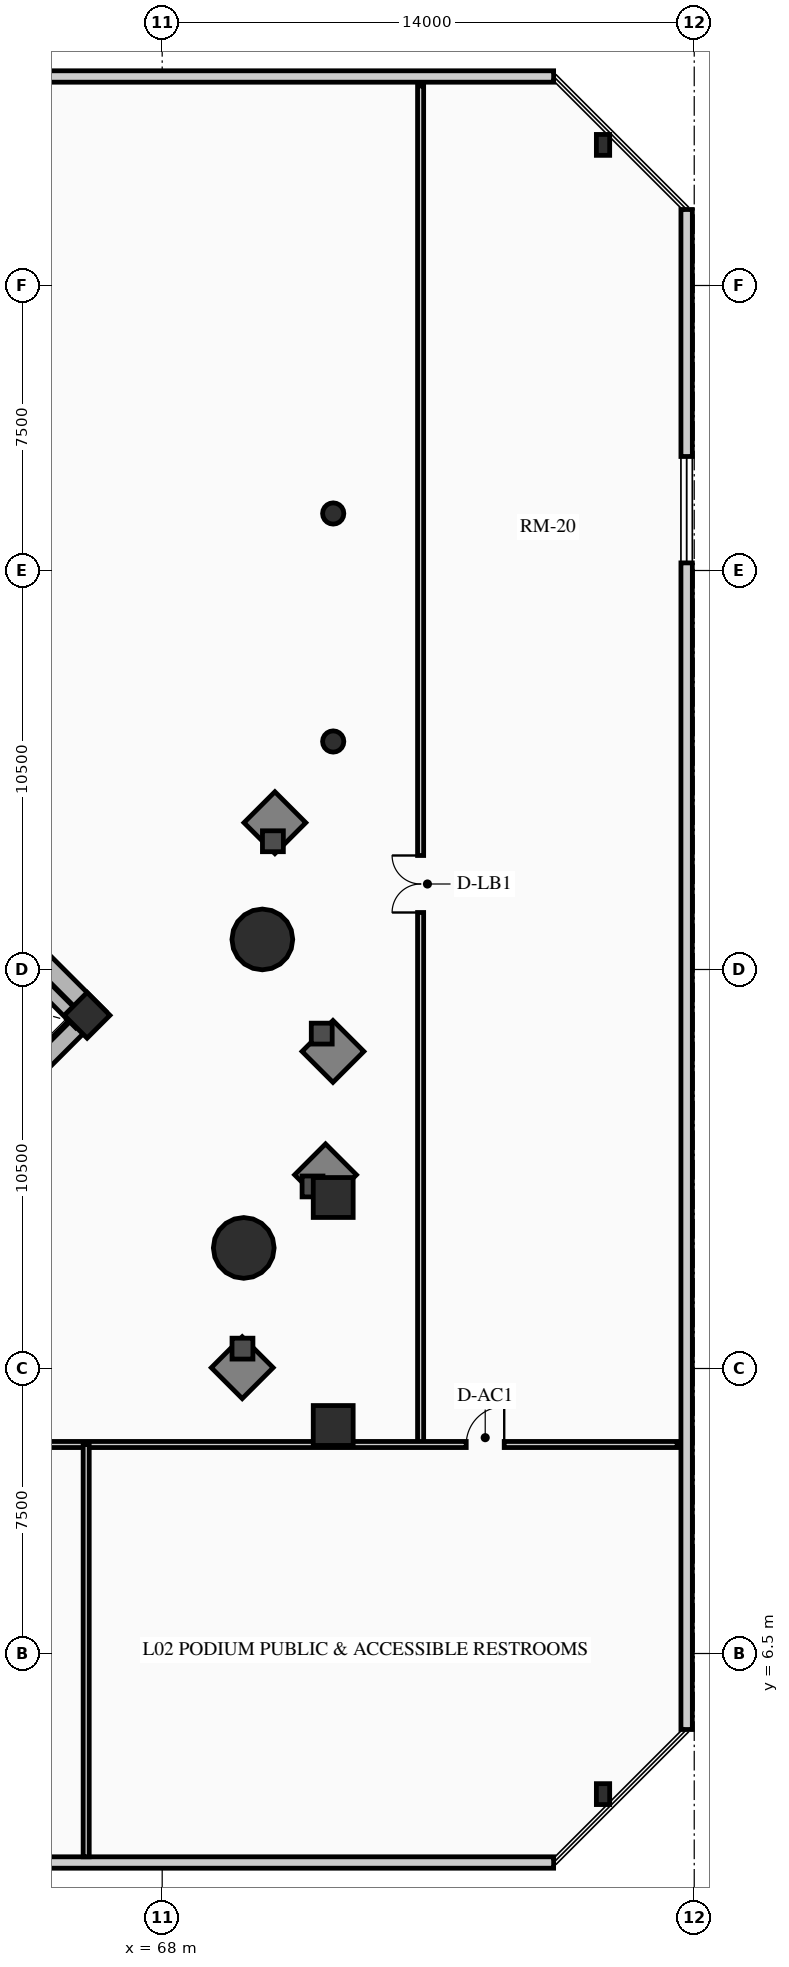
"""IFC4 building model, lengths in metres.
Left out: names, types, materials, properties, quantities, classifications, styles, units other than length and angle.
Written with IfcOpenShell. Run it as: python <this file> out.ifc"""

import sys

from ifc_helpers import new_model, si_unit, direction, frame, frame_2d, origin, origin_2d, place, context, subcontext, project, spatial, rectangle, hollow_rectangle, circle, hollow_circle, extrude, source, transform, mapped, element, fill, save


model = new_model("IFC4")
c1 = context("Model", 3, precision=1e-05, world=origin(), true_north=direction((0.0, 1.0)))
c2 = subcontext(c1, "Body", "Model", "MODEL_VIEW")
j1 = project(units=[si_unit("LENGTHUNIT", "METRE"), si_unit("PLANEANGLEUNIT", "RADIAN")], contexts=[c1])
p1 = place(None, origin())
s1 = spatial("IfcSite", under=j1, at=p1, CompositionType="ELEMENT")
p2 = place(p1, origin())
s2 = spatial("IfcBuilding", under=s1, at=p2, CompositionType="ELEMENT")
p3 = place(p2, frame((0.0, 0.0, 9.0)))
s3 = spatial("IfcBuildingStorey", under=s2, at=p3, CompositionType="ELEMENT", Elevation=9.0)
p4 = place(p3, frame((66.339, 23.227, 0.0), z_axis=(0.0, 0.0, 1.0), x_axis=(-0.707106781187, 0.707106781187, 0.0)))
e1 = element("IfcWall", 1, at=p4, inside=s3, PredefinedType="SHEAR", context=c2, shape_type="SweptSolid", body=[
    extrude(rectangle(XDim=14.3, YDim=0.5, at=frame_2d((7.15, 0.0))), origin(), (0.0, 0.0, 1.0), 4.2),
])
p5 = place(p3, frame((58.596, 15.838, 0.0), z_axis=(0.0, 0.0, 1.0), x_axis=(0.707106781187, 0.707106781187, 0.0)))
e2 = element("IfcWall", 2, at=p5, inside=s3, PredefinedType="SHEAR", context=c2, shape_type="SweptSolid", body=[
    extrude(rectangle(XDim=10.7, YDim=0.5, at=frame_2d((5.35, 0.0))), origin(), (0.0, 0.0, 1.0), 4.2),
])
m1 = source(origin(), c2, "Body", "SweptSolid", [
    extrude(rectangle(XDim=1.5, YDim=2.02, at=frame_2d((0.75, 1.01))), frame((0.0, 0.26, 0.0), z_axis=(0.0, -1.0, 0.0), x_axis=(1.0, 0.0, 0.0)), (0.0, 0.0, 1.0), 0.52),
])
p6 = place(p5, frame((5.45, 0.0, 0.0)))
e3 = element("IfcOpeningElement", 3, at=p6, cuts=e2, PredefinedType="OPENING", context=c2, shape_type="MappedRepresentation", body=[
    mapped(m1, transform((0.0, 0.0, 0.0), x_axis=(1.0, 0.0, 0.0), y_axis=(0.0, 1.0, 0.0), z_axis=(0.0, 0.0, 1.0), scale=1.0)),
])
p7 = place(p3, frame((65.847, 23.089, 0.0), z_axis=(0.0, 0.0, 1.0), x_axis=(-0.707106781187, 0.707106781187, 0.0)))
e4 = element("IfcWall", 4, at=p7, inside=s3, PredefinedType="SHEAR", context=c2, shape_type="SweptSolid", body=[
    extrude(rectangle(XDim=6.745, YDim=0.35, at=frame_2d((3.373, 0.0))), origin(), (0.0, 0.0, 1.0), 4.2),
])
p8 = place(p3, frame((66.024, 23.294, 0.0), z_axis=(0.0, 0.0, 1.0), x_axis=(0.707106781187, 0.707106781187, 0.0)))
e5 = element("IfcColumn", 5, at=p8, inside=s3, PredefinedType="COLUMN", context=c2, shape_type="SweptSolid", body=[
    extrude(rectangle(XDim=0.85, YDim=0.85, at=origin_2d()), origin(), (0.0, 0.0, 1.0), 4.2),
])
for number, where, z_axis, x_axis in (
    (6, (70.146, 17.173, 0.0), (0.0, 0.0, 1.0), (1.0, 0.0, 0.0)),
    (7, (70.635, 25.291, 0.0), (0.0, 0.0, 1.0), (1.0, 0.0, 0.0)),
):
    element("IfcColumn", number, at=place(p3, frame(where, z_axis=z_axis, x_axis=x_axis)), inside=s3, PredefinedType="USERDEFINED", context=c2, shape_type="SweptSolid", body=[
        extrude(circle(Radius=0.8, at=origin_2d()), origin(), (0.0, 0.0, 1.0), 4.2),
    ])
for number, where, z_axis, x_axis in (
    (8, (79.6, 46.2, 0.0), (0.0, 0.0, 1.0), (1.0, 0.0, 0.0)),
    (9, (79.6, 2.8, 0.0), (0.0, 0.0, 1.0), (1.0, 0.0, 0.0)),
):
    element("IfcColumn", number, at=place(p3, frame(where, z_axis=z_axis, x_axis=x_axis)), inside=s3, PredefinedType="PILASTER", context=c2, shape_type="SweptSolid", body=[
        extrude(hollow_rectangle(XDim=0.35, YDim=0.55, WallThickness=0.022, at=origin_2d()), origin(), (0.0, 0.0, 1.0), 4.2),
    ])
for number, where, z_axis, x_axis in (
    (10, (72.5, 12.5, 0.0), (0.0, 0.0, 1.0), (1.0, 0.0, 0.0)),
    (11, (72.5, 18.5, 0.0), (0.0, 0.0, 1.0), (1.0, 0.0, 0.0)),
):
    element("IfcColumn", number, at=place(p3, frame(where, z_axis=z_axis, x_axis=x_axis)), inside=s3, PredefinedType="COLUMN", context=c2, shape_type="SweptSolid", body=[
        extrude(rectangle(XDim=1.05, YDim=1.05, at=origin_2d()), origin(), (0.0, 0.0, 1.0), 4.2),
    ])
for number, where, z_axis, x_axis in (
    (12, (72.5, 30.5, 0.0), (0.0, 0.0, 1.0), (1.0, 0.0, 0.0)),
    (13, (72.5, 36.5, 0.0), (0.0, 0.0, 1.0), (1.0, 0.0, 0.0)),
):
    element("IfcColumn", number, at=place(p3, frame(where, z_axis=z_axis, x_axis=x_axis)), inside=s3, PredefinedType="COLUMN", context=c2, shape_type="SweptSolid", body=[
        extrude(hollow_circle(Radius=0.28, WallThickness=0.02, at=origin_2d()), origin(), (0.0, 0.0, 1.0), 4.2),
    ])
p9 = place(p3, frame((3.8, 48.0, 0.0), z_axis=(0.0, 0.0, 1.0), x_axis=(1.0, 0.0, 0.0)))
e14 = element("IfcWall", 14, at=p9, inside=s3, PredefinedType="SOLIDWALL", context=c2, shape_type="SweptSolid", body=[
    extrude(rectangle(XDim=74.5, YDim=0.3, at=frame_2d((37.25, 0.0))), origin(), (0.0, 0.0, 1.0), 3.885),
])
m2 = source(origin(), c2, "Body", "SweptSolid", [
    extrude(rectangle(XDim=2.8, YDim=2.1, at=frame_2d((1.4, 1.05))), frame((0.0, 0.16, 0.0), z_axis=(0.0, -1.0, 0.0), x_axis=(1.0, 0.0, 0.0)), (0.0, 0.0, 1.0), 0.32),
])
p10 = place(p9, frame((6.5, 0.0, 0.8)))
e15 = element("IfcOpeningElement", 15, at=p10, cuts=e14, PredefinedType="OPENING", context=c2, shape_type="MappedRepresentation", body=[
    mapped(m2, transform((0.0, 0.0, 0.0), x_axis=(1.0, 0.0, 0.0), y_axis=(0.0, 1.0, 0.0), z_axis=(0.0, 0.0, 1.0), scale=1.0)),
])
p11 = place(p9, frame((39.5, 0.0, 0.8)))
e16 = element("IfcOpeningElement", 16, at=p11, cuts=e14, PredefinedType="OPENING", context=c2, shape_type="MappedRepresentation", body=[
    mapped(m2, transform((0.0, 0.0, 0.0), x_axis=(1.0, 0.0, 0.0), y_axis=(0.0, 1.0, 0.0), z_axis=(0.0, 0.0, 1.0), scale=1.0)),
])
p12 = place(p3, frame((81.8, 44.5, 0.0), z_axis=(0.0, 0.0, 1.0), x_axis=(0.0, -1.0, 0.0)))
e17 = element("IfcWall", 17, at=p12, inside=s3, PredefinedType="SOLIDWALL", context=c2, shape_type="SweptSolid", body=[
    extrude(rectangle(XDim=40.0, YDim=0.3, at=frame_2d((20.0, 0.0))), origin(), (0.0, 0.0, 1.0), 3.885),
])
p13 = place(p12, frame((6.5, 0.0, 0.8)))
e18 = element("IfcOpeningElement", 18, at=p13, cuts=e17, PredefinedType="OPENING", context=c2, shape_type="MappedRepresentation", body=[
    mapped(m2, transform((0.0, 0.0, 0.0), x_axis=(1.0, 0.0, 0.0), y_axis=(0.0, 1.0, 0.0), z_axis=(0.0, 0.0, 1.0), scale=1.0)),
])
p14 = place(p3, frame((78.3, 1.0, 0.0), z_axis=(0.0, 0.0, 1.0), x_axis=(-1.0, 0.0, 0.0)))
e19 = element("IfcWall", 19, at=p14, inside=s3, PredefinedType="SOLIDWALL", context=c2, shape_type="SweptSolid", body=[
    extrude(rectangle(XDim=74.5, YDim=0.3, at=frame_2d((37.25, 0.0))), origin(), (0.0, 0.0, 1.0), 3.885),
])
p15 = place(p14, frame((17.5, 0.0, 0.8)))
e20 = element("IfcOpeningElement", 20, at=p15, cuts=e19, PredefinedType="OPENING", context=c2, shape_type="MappedRepresentation", body=[
    mapped(m2, transform((0.0, 0.0, 0.0), x_axis=(1.0, 0.0, 0.0), y_axis=(0.0, 1.0, 0.0), z_axis=(0.0, 0.0, 1.0), scale=1.0)),
])
p16 = place(p3, frame((74.8, 12.0, 0.0), z_axis=(0.0, 0.0, 1.0), x_axis=(0.0, 1.0, 0.0)))
e21 = element("IfcWall", 21, at=p16, inside=s3, PredefinedType="PARTITIONING", context=c2, shape_type="SweptSolid", body=[
    extrude(rectangle(XDim=35.75, YDim=0.16, at=frame_2d((17.875, 0.0))), origin(), (0.0, 0.0, 1.0), 2.929),
])
m3 = source(origin(), c2, "Body", "SweptSolid", [
    extrude(rectangle(XDim=1.5, YDim=2.02, at=frame_2d((0.75, 1.01))), frame((0.0, 0.09, 0.0), z_axis=(0.0, -1.0, 0.0), x_axis=(1.0, 0.0, 0.0)), (0.0, 0.0, 1.0), 0.18),
])
p17 = place(p16, frame((14.0, 0.0, 0.0)))
e22 = element("IfcOpeningElement", 22, at=p17, cuts=e21, PredefinedType="OPENING", context=c2, shape_type="MappedRepresentation", body=[
    mapped(m3, transform((0.0, 0.0, 0.0), x_axis=(1.0, 0.0, 0.0), y_axis=(0.0, 1.0, 0.0), z_axis=(0.0, 0.0, 1.0), scale=1.0)),
])
p18 = place(p3, frame((32.5, 12.0, 0.0), z_axis=(0.0, 0.0, 1.0), x_axis=(1.0, 0.0, 0.0)))
e23 = element("IfcWall", 23, at=p18, inside=s3, PredefinedType="PARTITIONING", context=c2, shape_type="SweptSolid", body=[
    extrude(rectangle(XDim=49.05, YDim=0.16, at=frame_2d((24.525, 0.0))), origin(), (0.0, 0.0, 1.0), 2.929),
])
p19 = place(p18, frame((5.5, 0.0, 0.0)))
e24 = element("IfcOpeningElement", 24, at=p19, cuts=e23, PredefinedType="OPENING", context=c2, shape_type="MappedRepresentation", body=[
    mapped(m3, transform((0.0, 0.0, 0.0), x_axis=(1.0, 0.0, 0.0), y_axis=(0.0, 1.0, 0.0), z_axis=(0.0, 0.0, 1.0), scale=1.0)),
])
m4 = source(origin(), c2, "Body", "SweptSolid", [
    extrude(rectangle(XDim=1.0, YDim=2.015, at=frame_2d((0.5, 1.007))), frame((0.0, 0.09, 0.0), z_axis=(0.0, -1.0, 0.0), x_axis=(1.0, 0.0, 0.0)), (0.0, 0.0, 1.0), 0.18),
])
p20 = place(p18, frame((43.5, 0.0, 0.0)))
e25 = element("IfcOpeningElement", 25, at=p20, cuts=e23, PredefinedType="OPENING", context=c2, shape_type="MappedRepresentation", body=[
    mapped(m4, transform((0.0, 0.0, 0.0), x_axis=(1.0, 0.0, 0.0), y_axis=(0.0, 1.0, 0.0), z_axis=(0.0, 0.0, 1.0), scale=1.0)),
])
p21 = place(p3, frame((66.0, 1.15, 0.0), z_axis=(0.0, 0.0, 1.0), x_axis=(0.0, 1.0, 0.0)))
e26 = element("IfcWall", 26, at=p21, inside=s3, PredefinedType="PARTITIONING", context=c2, shape_type="SweptSolid", body=[
    extrude(rectangle(XDim=10.85, YDim=0.16, at=frame_2d((5.425, 0.0))), origin(), (0.0, 0.0, 1.0), 2.929),
])
m5 = source(origin(), c2, "Body", "SweptSolid", [
    extrude(rectangle(XDim=2.8, YDim=2.1, at=frame_2d((1.4, 1.05))), frame((0.0, 0.03, 0.0), z_axis=(0.0, -1.0, 0.0), x_axis=(1.0, 0.0, 0.0)), (0.0, 0.0, 1.0), 0.06),
])
p22 = place(p13, origin())
e27 = element("IfcWindow", 27, at=p22, inside=s3, PartitioningType="TRIPLE_PANEL_VERTICAL", PredefinedType="WINDOW", context=c2, shape_type="MappedRepresentation", body=[
    mapped(m5, transform((0.0, 0.0, 0.0), x_axis=(1.0, 0.0, 0.0), y_axis=(0.0, 1.0, 0.0), z_axis=(0.0, 0.0, 1.0), scale=1.0)),
])
fill(e18, e27)
m6 = source(origin(), c2, "Body", "SweptSolid", [
    extrude(rectangle(XDim=1.5, YDim=2.02, at=frame_2d((0.75, 1.01))), frame((0.0, 0.025, 0.0), z_axis=(0.0, -1.0, 0.0), x_axis=(1.0, 0.0, 0.0)), (0.0, 0.0, 1.0), 0.05),
])
p23 = place(p17, origin())
e28 = element("IfcDoor", 28, at=p23, inside=s3, OperationType="DOUBLE_DOOR_SINGLE_SWING", PredefinedType="DOOR", context=c2, shape_type="MappedRepresentation", body=[
    mapped(m6, transform((0.0, 0.0, 0.0), x_axis=(1.0, 0.0, 0.0), y_axis=(0.0, 1.0, 0.0), z_axis=(0.0, 0.0, 1.0), scale=1.0)),
])
fill(e22, e28)
m7 = source(origin(), c2, "Body", "SweptSolid", [
    extrude(rectangle(XDim=1.0, YDim=2.015, at=frame_2d((0.5, 1.007))), frame((0.0, 0.025, 0.0), z_axis=(0.0, -1.0, 0.0), x_axis=(1.0, 0.0, 0.0)), (0.0, 0.0, 1.0), 0.05),
])
p24 = place(p20, origin())
e29 = element("IfcDoor", 29, at=p24, inside=s3, OperationType="SINGLE_SWING_RIGHT", PredefinedType="DOOR", context=c2, shape_type="MappedRepresentation", body=[
    mapped(m7, transform((0.0, 0.0, 0.0), x_axis=(1.0, 0.0, 0.0), y_axis=(0.0, 1.0, 0.0), z_axis=(0.0, 0.0, 1.0), scale=1.0)),
])
fill(e25, e29)
save(model, sys.argv[1])
